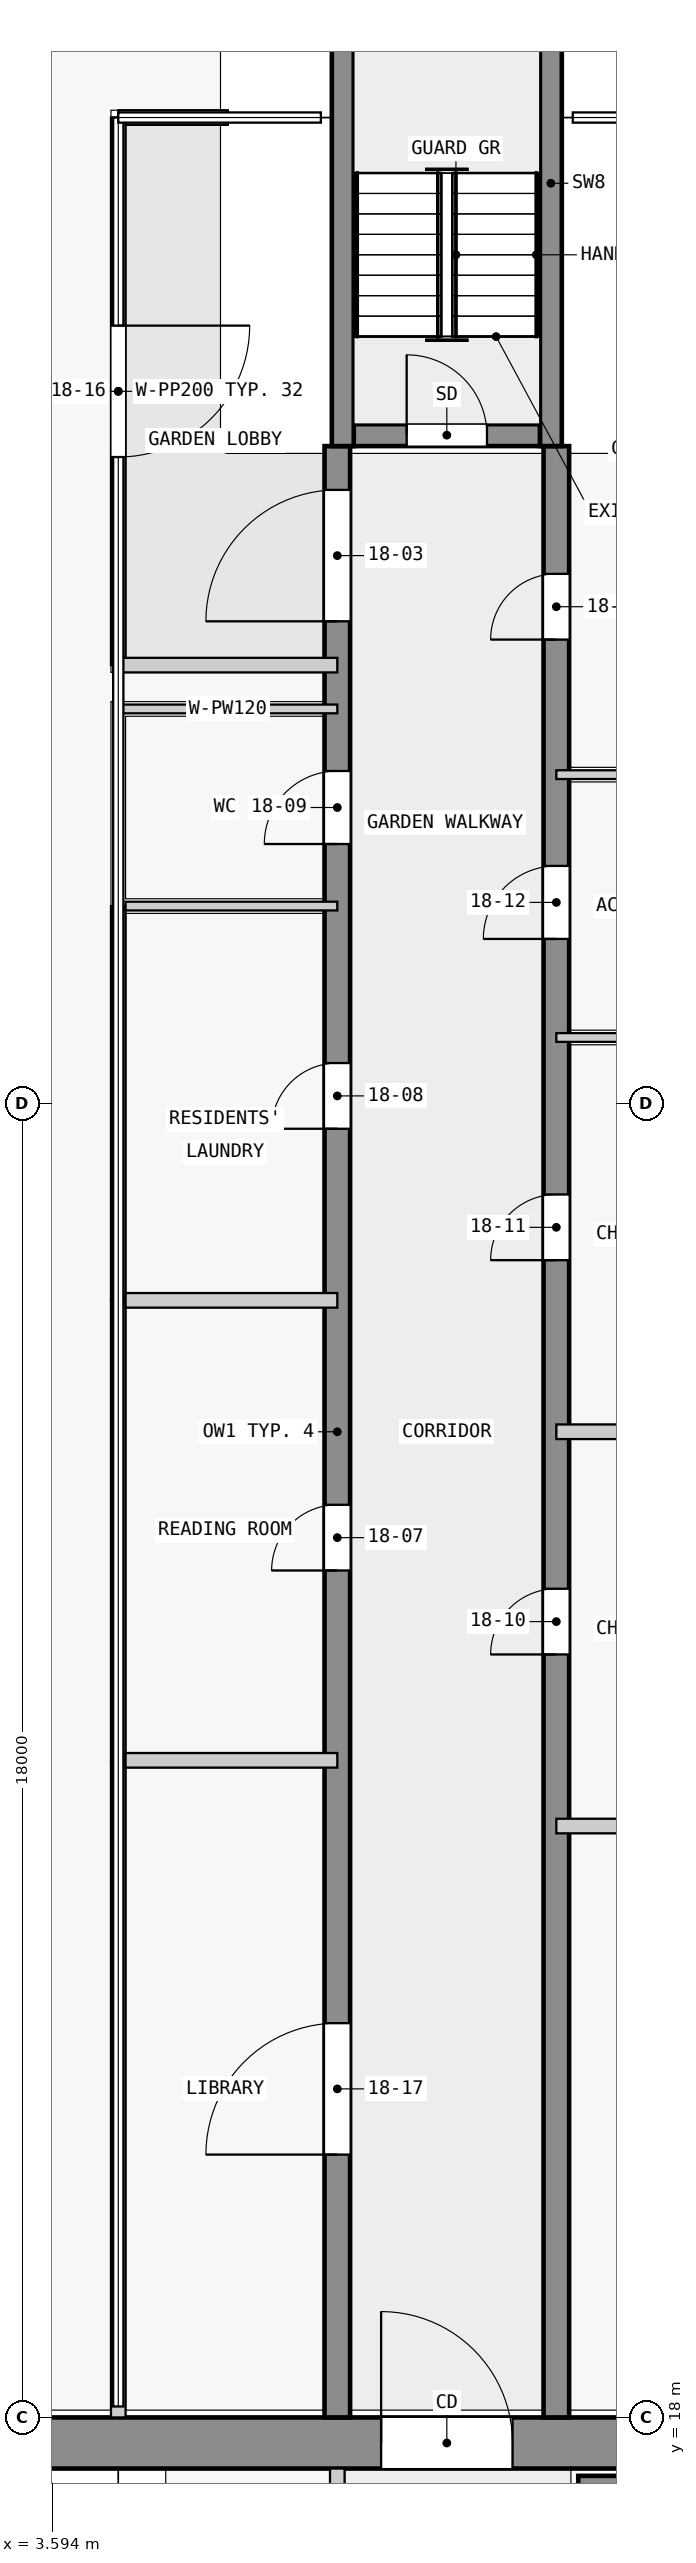
"""IFC4 building model, lengths in metres.
Left out: names, types, materials, properties, quantities, classifications, styles, units other than length and angle.
Written with IfcOpenShell. Run it as: python <this file> out.ifc"""

import sys

from ifc_helpers import new_model, si_unit, direction, frame, frame_2d, origin, place, context, subcontext, project, spatial, rectangle, extrude, element, fill, save


model = new_model("IFC4")
c1 = context("Model", 3, precision=1e-05, world=origin(), true_north=direction((0.0, 1.0)))
c2 = subcontext(c1, "Body", "Model", "MODEL_VIEW")
j1 = project(units=[si_unit("LENGTHUNIT", "METRE"), si_unit("PLANEANGLEUNIT", "RADIAN")], contexts=[c1])
p1 = place(None, origin())
s1 = spatial("IfcSite", under=j1, at=p1, CompositionType="ELEMENT")
p2 = place(p1, origin())
s2 = spatial("IfcBuilding", under=s1, at=p2, CompositionType="ELEMENT")
p3 = place(p2, frame((0.0, 0.0, 72.3)))
s3 = spatial("IfcBuildingStorey", under=s2, at=p3, CompositionType="ELEMENT", Elevation=72.3)
p4 = place(p3, frame((1.6, 17.65, 0.0), z_axis=(0.0, 0.0, 1.0), x_axis=(1.0, 0.0, 0.0)))
e1 = element("IfcWall", 1, at=p4, inside=s3, PredefinedType="SHEAR", context=c2, shape_type="SweptSolid", body=[
    extrude(rectangle(XDim=20.9, YDim=0.7, at=frame_2d((10.45, 0.0))), origin(), (0.0, 0.0, 1.0), 5.75),
])
p5 = place(p4, frame((6.5, 0.0, 0.0)))
e2 = element("IfcOpeningElement", 2, at=p5, cuts=e1, PredefinedType="OPENING", context=c2, shape_type="SweptSolid", body=[
    extrude(rectangle(XDim=1.8, YDim=2.1, at=frame_2d((0.9, 1.05))), frame((0.0, 0.36, 0.0), z_axis=(0.0, -1.0, 0.0), x_axis=(1.0, 0.0, 0.0)), (0.0, 0.0, 1.0), 0.72),
])
p6 = place(p3, frame((10.8, 17.05, 0.0), z_axis=(0.0, 0.0, 1.0), x_axis=(1.0, 0.0, 0.0)))
e3 = element("IfcWall", 3, at=p6, inside=s3, PredefinedType="SHEAR", context=c2, shape_type="SweptSolid", body=[
    extrude(rectangle(XDim=7.8, YDim=0.3, at=frame_2d((3.9, 0.0))), origin(), (0.0, 0.0, 1.0), 5.75),
])
p7 = place(p3, frame((7.725, 45.15, 0.0), z_axis=(0.0, 0.0, 1.0), x_axis=(1.0, 0.0, 0.0)))
e4 = element("IfcWall", 4, at=p7, inside=s3, PredefinedType="SHEAR", context=c2, shape_type="SweptSolid", body=[
    extrude(rectangle(XDim=2.55, YDim=0.3, at=frame_2d((1.275, 0.0))), origin(), (0.0, 0.0, 1.0), 6.0),
])
p8 = place(p7, frame((0.725, 0.0, 0.0)))
e5 = element("IfcOpeningElement", 5, at=p8, cuts=e4, PredefinedType="OPENING", context=c2, shape_type="SweptSolid", body=[
    extrude(rectangle(XDim=1.1, YDim=2.1, at=frame_2d((0.55, 1.05))), frame((0.0, 0.16, 0.0), z_axis=(0.0, -1.0, 0.0), x_axis=(1.0, 0.0, 0.0)), (0.0, 0.0, 1.0), 0.32),
])
for number, where, z_axis, x_axis in (
    (6, (7.575, 45.0, 0.0), (0.0, 0.0, 1.0), (0.0, 1.0, 0.0)),
    (7, (10.425, 45.0, 0.0), (0.0, 0.0, 1.0), (0.0, 1.0, 0.0)),
):
    element("IfcWall", number, at=place(p3, frame(where, z_axis=z_axis, x_axis=x_axis)), inside=s3, PredefinedType="SHEAR", context=c2, shape_type="SweptSolid", body=[
        extrude(rectangle(XDim=7.2, YDim=0.3, at=frame_2d((3.6, 0.0))), origin(), (0.0, 0.0, 1.0), 6.0),
    ])
p9 = place(p3, frame((7.5, 18.0, 0.0), z_axis=(0.0, 0.0, 1.0), x_axis=(0.0, 1.0, 0.0)))
e8 = element("IfcWall", 8, at=p9, inside=s3, PredefinedType="SHEAR", context=c2, shape_type="SweptSolid", body=[
    extrude(rectangle(XDim=27.0, YDim=0.35, at=frame_2d((13.5, 0.0))), origin(), (0.0, 0.0, 1.0), 5.75),
])
p10 = place(p9, frame((24.6, 0.0, 0.0)))
e9 = element("IfcOpeningElement", 9, at=p10, cuts=e8, PredefinedType="OPENING", context=c2, shape_type="SweptSolid", body=[
    extrude(rectangle(XDim=1.8, YDim=2.1, at=frame_2d((0.9, 1.05))), frame((0.0, 0.185, 0.0), z_axis=(0.0, -1.0, 0.0), x_axis=(1.0, 0.0, 0.0)), (0.0, 0.0, 1.0), 0.37),
])
p11 = place(p9, frame((11.6, 0.0, 0.0)))
e10 = element("IfcOpeningElement", 10, at=p11, cuts=e8, PredefinedType="OPENING", context=c2, shape_type="SweptSolid", body=[
    extrude(rectangle(XDim=0.9, YDim=2.1, at=frame_2d((0.45, 1.05))), frame((0.0, 0.185, 0.0), z_axis=(0.0, -1.0, 0.0), x_axis=(1.0, 0.0, 0.0)), (0.0, 0.0, 1.0), 0.37),
])
p12 = place(p9, frame((17.65, 0.0, 0.0)))
e11 = element("IfcOpeningElement", 11, at=p12, cuts=e8, PredefinedType="OPENING", context=c2, shape_type="SweptSolid", body=[
    extrude(rectangle(XDim=0.9, YDim=2.1, at=frame_2d((0.45, 1.05))), frame((0.0, 0.185, 0.0), z_axis=(0.0, -1.0, 0.0), x_axis=(1.0, 0.0, 0.0)), (0.0, 0.0, 1.0), 0.37),
])
p13 = place(p9, frame((21.55, 0.0, 0.0)))
e12 = element("IfcOpeningElement", 12, at=p13, cuts=e8, PredefinedType="OPENING", context=c2, shape_type="SweptSolid", body=[
    extrude(rectangle(XDim=1.0, YDim=2.1, at=frame_2d((0.5, 1.05))), frame((0.0, 0.185, 0.0), z_axis=(0.0, -1.0, 0.0), x_axis=(1.0, 0.0, 0.0)), (0.0, 0.0, 1.0), 0.37),
])
p14 = place(p9, frame((3.6, 0.0, 0.0)))
e13 = element("IfcOpeningElement", 13, at=p14, cuts=e8, PredefinedType="OPENING", context=c2, shape_type="SweptSolid", body=[
    extrude(rectangle(XDim=1.8, YDim=2.1, at=frame_2d((0.9, 1.05))), frame((0.0, 0.185, 0.0), z_axis=(0.0, -1.0, 0.0), x_axis=(1.0, 0.0, 0.0)), (0.0, 0.0, 1.0), 0.37),
])
p15 = place(p3, frame((10.5, 18.0, 0.0), z_axis=(0.0, 0.0, 1.0), x_axis=(0.0, 1.0, 0.0)))
e14 = element("IfcWall", 14, at=p15, inside=s3, PredefinedType="SHEAR", context=c2, shape_type="SweptSolid", body=[
    extrude(rectangle(XDim=27.0, YDim=0.35, at=frame_2d((13.5, 0.0))), origin(), (0.0, 0.0, 1.0), 5.75),
])
p16 = place(p15, frame((10.45, 0.0, 0.0)))
e15 = element("IfcOpeningElement", 15, at=p16, cuts=e14, PredefinedType="OPENING", context=c2, shape_type="SweptSolid", body=[
    extrude(rectangle(XDim=0.9, YDim=2.1, at=frame_2d((0.45, 1.05))), frame((0.0, 0.185, 0.0), z_axis=(0.0, -1.0, 0.0), x_axis=(1.0, 0.0, 0.0)), (0.0, 0.0, 1.0), 0.37),
])
p17 = place(p15, frame((15.85, 0.0, 0.0)))
e16 = element("IfcOpeningElement", 16, at=p17, cuts=e14, PredefinedType="OPENING", context=c2, shape_type="SweptSolid", body=[
    extrude(rectangle(XDim=0.9, YDim=2.1, at=frame_2d((0.45, 1.05))), frame((0.0, 0.185, 0.0), z_axis=(0.0, -1.0, 0.0), x_axis=(1.0, 0.0, 0.0)), (0.0, 0.0, 1.0), 0.37),
])
p18 = place(p15, frame((20.25, 0.0, 0.0)))
e17 = element("IfcOpeningElement", 17, at=p18, cuts=e14, PredefinedType="OPENING", context=c2, shape_type="SweptSolid", body=[
    extrude(rectangle(XDim=1.0, YDim=2.1, at=frame_2d((0.5, 1.05))), frame((0.0, 0.185, 0.0), z_axis=(0.0, -1.0, 0.0), x_axis=(1.0, 0.0, 0.0)), (0.0, 0.0, 1.0), 0.37),
])
p19 = place(p15, frame((24.35, 0.0, 0.0)))
e18 = element("IfcOpeningElement", 18, at=p19, cuts=e14, PredefinedType="OPENING", context=c2, shape_type="SweptSolid", body=[
    extrude(rectangle(XDim=0.9, YDim=2.1, at=frame_2d((0.45, 1.05))), frame((0.0, 0.185, 0.0), z_axis=(0.0, -1.0, 0.0), x_axis=(1.0, 0.0, 0.0)), (0.0, 0.0, 1.0), 0.37),
])
p20 = place(p3, frame((7.5, 10.1, 0.0), z_axis=(0.0, 0.0, 1.0), x_axis=(0.0, 1.0, 0.0)))
e19 = element("IfcWall", 19, at=p20, inside=s3, PredefinedType="PARTITIONING", context=c2, shape_type="SweptSolid", body=[
    extrude(rectangle(XDim=7.2, YDim=0.2, at=frame_2d((3.6, 0.0))), origin(), (0.0, 0.0, 1.0), 5.75),
])
p21 = place(p20, frame((0.75, 0.0, 0.0)))
e20 = element("IfcOpeningElement", 20, at=p21, cuts=e19, PredefinedType="OPENING", context=c2, shape_type="SweptSolid", body=[
    extrude(rectangle(XDim=0.9, YDim=2.1, at=frame_2d((0.45, 1.05))), frame((0.0, 0.11, 0.0), z_axis=(0.0, -1.0, 0.0), x_axis=(1.0, 0.0, 0.0)), (0.0, 0.0, 1.0), 0.22),
])
p22 = place(p20, frame((4.35, 0.0, 0.0)))
e21 = element("IfcOpeningElement", 21, at=p22, cuts=e19, PredefinedType="OPENING", context=c2, shape_type="SweptSolid", body=[
    extrude(rectangle(XDim=0.9, YDim=2.1, at=frame_2d((0.45, 1.05))), frame((0.0, 0.11, 0.0), z_axis=(0.0, -1.0, 0.0), x_axis=(1.0, 0.0, 0.0)), (0.0, 0.0, 1.0), 0.22),
])
p23 = place(p3, frame((6.0, 49.5, 0.0), z_axis=(0.0, 0.0, 1.0), x_axis=(-1.0, 0.0, 0.0)))
e22 = element("IfcWall", 22, at=p23, inside=s3, PredefinedType="PARTITIONING", context=c2, shape_type="SweptSolid", body=[
    extrude(rectangle(XDim=1.5, YDim=0.2, at=frame_2d((0.75, 0.0))), origin(), (0.0, 0.0, 1.0), 5.75),
])
p24 = place(p3, frame((4.5, 49.5, 0.0), z_axis=(0.0, 0.0, 1.0), x_axis=(0.0, -1.0, 0.0)))
e23 = element("IfcWall", 23, at=p24, inside=s3, PredefinedType="PARTITIONING", context=c2, shape_type="SweptSolid", body=[
    extrude(rectangle(XDim=7.5, YDim=0.2, at=frame_2d((3.75, 0.0))), origin(), (0.0, 0.0, 1.0), 5.75),
])
p25 = place(p24, frame((2.85, 0.0, 0.0)))
e24 = element("IfcOpeningElement", 24, at=p25, cuts=e23, PredefinedType="OPENING", context=c2, shape_type="SweptSolid", body=[
    extrude(rectangle(XDim=1.8, YDim=2.1, at=frame_2d((0.9, 1.05))), frame((0.0, 0.11, 0.0), z_axis=(0.0, -1.0, 0.0), x_axis=(1.0, 0.0, 0.0)), (0.0, 0.0, 1.0), 0.22),
])
p26 = place(p3, frame((4.5, 42.0, 0.0), z_axis=(0.0, 0.0, 1.0), x_axis=(1.0, 0.0, 0.0)))
e25 = element("IfcWall", 25, at=p26, inside=s3, PredefinedType="PARTITIONING", context=c2, shape_type="SweptSolid", body=[
    extrude(rectangle(XDim=3.0, YDim=0.2, at=frame_2d((1.5, 0.0))), origin(), (0.0, 0.0, 1.0), 5.75),
])
p27 = place(p3, frame((4.5, 27.0, 0.0), z_axis=(0.0, 0.0, 1.0), x_axis=(0.0, -1.0, 0.0)))
e26 = element("IfcWall", 26, at=p27, inside=s3, PredefinedType="PARTITIONING", context=c2, shape_type="SweptSolid", body=[
    extrude(rectangle(XDim=9.0, YDim=0.2, at=frame_2d((4.5, 0.0))), origin(), (0.0, 0.0, 1.0), 5.75),
])
p28 = place(p3, frame((4.5, 33.3, 0.0), z_axis=(0.0, 0.0, 1.0), x_axis=(0.0, -1.0, 0.0)))
e27 = element("IfcWall", 27, at=p28, inside=s3, PredefinedType="PARTITIONING", context=c2, shape_type="SweptSolid", body=[
    extrude(rectangle(XDim=6.3, YDim=0.2, at=frame_2d((3.15, 0.0))), origin(), (0.0, 0.0, 1.0), 5.75),
])
p29 = place(p3, frame((7.5, 41.4, 0.0), z_axis=(0.0, 0.0, 1.0), x_axis=(-1.0, 0.0, 0.0)))
e28 = element("IfcWall", 28, at=p29, inside=s3, PredefinedType="PARTITIONING", context=c2, shape_type="SweptSolid", body=[
    extrude(rectangle(XDim=3.0, YDim=0.12, at=frame_2d((1.5, 0.0))), origin(), (0.0, 0.0, 1.0), 5.75),
])
p30 = place(p3, frame((4.5, 41.4, 0.0), z_axis=(0.0, 0.0, 1.0), x_axis=(0.0, -1.0, 0.0)))
e29 = element("IfcWall", 29, at=p30, inside=s3, PredefinedType="PARTITIONING", context=c2, shape_type="SweptSolid", body=[
    extrude(rectangle(XDim=2.7, YDim=0.12, at=frame_2d((1.35, 0.0))), origin(), (0.0, 0.0, 1.0), 5.75),
])
p31 = place(p3, frame((4.5, 38.7, 0.0), z_axis=(0.0, 0.0, 1.0), x_axis=(0.0, -1.0, 0.0)))
e30 = element("IfcWall", 30, at=p31, inside=s3, PredefinedType="PARTITIONING", context=c2, shape_type="SweptSolid", body=[
    extrude(rectangle(XDim=5.4, YDim=0.2, at=frame_2d((2.7, 0.0))), origin(), (0.0, 0.0, 1.0), 5.75),
])
p32 = place(p3, frame((4.6, 33.3, 0.0), z_axis=(0.0, 0.0, 1.0), x_axis=(1.0, 0.0, 0.0)))
e31 = element("IfcWall", 31, at=p32, inside=s3, PredefinedType="PARTITIONING", context=c2, shape_type="SweptSolid", body=[
    extrude(rectangle(XDim=2.9, YDim=0.2, at=frame_2d((1.45, 0.0))), origin(), (0.0, 0.0, 1.0), 5.75),
])
p33 = place(p3, frame((4.6, 38.7, 0.0), z_axis=(0.0, 0.0, 1.0), x_axis=(1.0, 0.0, 0.0)))
e32 = element("IfcWall", 32, at=p33, inside=s3, PredefinedType="PARTITIONING", context=c2, shape_type="SweptSolid", body=[
    extrude(rectangle(XDim=2.9, YDim=0.12, at=frame_2d((1.45, 0.0))), origin(), (0.0, 0.0, 1.0), 5.75),
])
p34 = place(p3, frame((4.6, 27.0, 0.0), z_axis=(0.0, 0.0, 1.0), x_axis=(1.0, 0.0, 0.0)))
e33 = element("IfcWall", 33, at=p34, inside=s3, PredefinedType="PARTITIONING", context=c2, shape_type="SweptSolid", body=[
    extrude(rectangle(XDim=2.9, YDim=0.2, at=frame_2d((1.45, 0.0))), origin(), (0.0, 0.0, 1.0), 5.75),
])
p35 = place(p3, frame((10.5, 36.9, 0.0), z_axis=(0.0, 0.0, 1.0), x_axis=(1.0, 0.0, 0.0)))
e34 = element("IfcWall", 34, at=p35, inside=s3, PredefinedType="PARTITIONING", context=c2, shape_type="SweptSolid", body=[
    extrude(rectangle(XDim=2.9, YDim=0.12, at=frame_2d((1.45, 0.0))), origin(), (0.0, 0.0, 1.0), 5.75),
])
for number, where, z_axis, x_axis in (
    (35, (10.5, 26.1, 0.0), (0.0, 0.0, 1.0), (1.0, 0.0, 0.0)),
    (36, (10.5, 31.5, 0.0), (0.0, 0.0, 1.0), (1.0, 0.0, 0.0)),
):
    element("IfcWall", number, at=place(p3, frame(where, z_axis=z_axis, x_axis=x_axis)), inside=s3, PredefinedType="PARTITIONING", context=c2, shape_type="SweptSolid", body=[
        extrude(rectangle(XDim=2.9, YDim=0.2, at=frame_2d((1.45, 0.0))), origin(), (0.0, 0.0, 1.0), 5.75),
    ])
p36 = place(p3, frame((10.5, 40.5, 0.0), z_axis=(0.0, 0.0, 1.0), x_axis=(1.0, 0.0, 0.0)))
e37 = element("IfcWall", 37, at=p36, inside=s3, PredefinedType="PARTITIONING", context=c2, shape_type="SweptSolid", body=[
    extrude(rectangle(XDim=2.9, YDim=0.12, at=frame_2d((1.45, 0.0))), origin(), (0.0, 0.0, 1.0), 5.75),
])
p37 = place(p5, origin())
e38 = element("IfcDoor", 38, at=p37, inside=s3, OperationType="DOUBLE_DOOR_SINGLE_SWING", PredefinedType="DOOR", context=c2, shape_type="SweptSolid", body=[
    extrude(rectangle(XDim=1.8, YDim=2.1, at=frame_2d((0.9, 1.05))), frame((0.0, 0.025, 0.0), z_axis=(0.0, -1.0, 0.0), x_axis=(1.0, 0.0, 0.0)), (0.0, 0.0, 1.0), 0.05),
])
fill(e2, e38)
p38 = place(p8, origin())
e39 = element("IfcDoor", 39, at=p38, inside=s3, OperationType="SINGLE_SWING_LEFT", PredefinedType="DOOR", context=c2, shape_type="SweptSolid", body=[
    extrude(rectangle(XDim=1.1, YDim=2.1, at=frame_2d((0.55, 1.05))), frame((0.0, 0.025, 0.0), z_axis=(0.0, -1.0, 0.0), x_axis=(1.0, 0.0, 0.0)), (0.0, 0.0, 1.0), 0.05),
])
fill(e5, e39)
p39 = place(p10, origin())
e40 = element("IfcDoor", 40, at=p39, inside=s3, OperationType="DOUBLE_DOOR_SINGLE_SWING", PredefinedType="DOOR", context=c2, shape_type="SweptSolid", body=[
    extrude(rectangle(XDim=1.8, YDim=2.1, at=frame_2d((0.9, 1.05))), frame((0.0, 0.025, 0.0), z_axis=(0.0, -1.0, 0.0), x_axis=(1.0, 0.0, 0.0)), (0.0, 0.0, 1.0), 0.05),
])
fill(e9, e40)
p40 = place(p11, origin())
e41 = element("IfcDoor", 41, at=p40, inside=s3, OperationType="SINGLE_SWING_LEFT", PredefinedType="DOOR", context=c2, shape_type="SweptSolid", body=[
    extrude(rectangle(XDim=0.9, YDim=2.1, at=frame_2d((0.45, 1.05))), frame((0.0, 0.025, 0.0), z_axis=(0.0, -1.0, 0.0), x_axis=(1.0, 0.0, 0.0)), (0.0, 0.0, 1.0), 0.05),
])
fill(e10, e41)
p41 = place(p12, origin())
e42 = element("IfcDoor", 42, at=p41, inside=s3, OperationType="SINGLE_SWING_RIGHT", PredefinedType="DOOR", context=c2, shape_type="SweptSolid", body=[
    extrude(rectangle(XDim=0.9, YDim=2.1, at=frame_2d((0.45, 1.05))), frame((0.0, 0.025, 0.0), z_axis=(0.0, -1.0, 0.0), x_axis=(1.0, 0.0, 0.0)), (0.0, 0.0, 1.0), 0.05),
])
fill(e11, e42)
p42 = place(p13, origin())
e43 = element("IfcDoor", 43, at=p42, inside=s3, OperationType="SINGLE_SWING_RIGHT", PredefinedType="DOOR", context=c2, shape_type="SweptSolid", body=[
    extrude(rectangle(XDim=1.0, YDim=2.1, at=frame_2d((0.5, 1.05))), frame((0.0, 0.025, 0.0), z_axis=(0.0, -1.0, 0.0), x_axis=(1.0, 0.0, 0.0)), (0.0, 0.0, 1.0), 0.05),
])
fill(e12, e43)
p43 = place(p16, origin())
e44 = element("IfcDoor", 44, at=p43, inside=s3, OperationType="SINGLE_SWING_LEFT", PredefinedType="DOOR", context=c2, shape_type="SweptSolid", body=[
    extrude(rectangle(XDim=0.9, YDim=2.1, at=frame_2d((0.45, 1.05))), frame((0.0, 0.025, 0.0), z_axis=(0.0, -1.0, 0.0), x_axis=(1.0, 0.0, 0.0)), (0.0, 0.0, 1.0), 0.05),
])
fill(e15, e44)
p44 = place(p17, origin())
e45 = element("IfcDoor", 45, at=p44, inside=s3, OperationType="SINGLE_SWING_RIGHT", PredefinedType="DOOR", context=c2, shape_type="SweptSolid", body=[
    extrude(rectangle(XDim=0.9, YDim=2.1, at=frame_2d((0.45, 1.05))), frame((0.0, 0.025, 0.0), z_axis=(0.0, -1.0, 0.0), x_axis=(1.0, 0.0, 0.0)), (0.0, 0.0, 1.0), 0.05),
])
fill(e16, e45)
p45 = place(p18, origin())
e46 = element("IfcDoor", 46, at=p45, inside=s3, OperationType="SINGLE_SWING_RIGHT", PredefinedType="DOOR", context=c2, shape_type="SweptSolid", body=[
    extrude(rectangle(XDim=1.0, YDim=2.1, at=frame_2d((0.5, 1.05))), frame((0.0, 0.025, 0.0), z_axis=(0.0, -1.0, 0.0), x_axis=(1.0, 0.0, 0.0)), (0.0, 0.0, 1.0), 0.05),
])
fill(e17, e46)
p46 = place(p19, origin())
e47 = element("IfcDoor", 47, at=p46, inside=s3, OperationType="SINGLE_SWING_RIGHT", PredefinedType="DOOR", context=c2, shape_type="SweptSolid", body=[
    extrude(rectangle(XDim=0.9, YDim=2.1, at=frame_2d((0.45, 1.05))), frame((0.0, 0.025, 0.0), z_axis=(0.0, -1.0, 0.0), x_axis=(1.0, 0.0, 0.0)), (0.0, 0.0, 1.0), 0.05),
])
fill(e18, e47)
p47 = place(p25, origin())
e48 = element("IfcDoor", 48, at=p47, inside=s3, OperationType="DOUBLE_DOOR_SINGLE_SWING", PredefinedType="DOOR", context=c2, shape_type="SweptSolid", body=[
    extrude(rectangle(XDim=1.8, YDim=2.1, at=frame_2d((0.9, 1.05))), frame((0.0, 0.025, 0.0), z_axis=(0.0, -1.0, 0.0), x_axis=(1.0, 0.0, 0.0)), (0.0, 0.0, 1.0), 0.05),
])
fill(e24, e48)
p48 = place(p14, origin())
e49 = element("IfcDoor", 49, at=p48, inside=s3, OperationType="DOUBLE_DOOR_SINGLE_SWING", PredefinedType="DOOR", context=c2, shape_type="SweptSolid", body=[
    extrude(rectangle(XDim=1.8, YDim=2.1, at=frame_2d((0.9, 1.05))), frame((0.0, 0.025, 0.0), z_axis=(0.0, -1.0, 0.0), x_axis=(1.0, 0.0, 0.0)), (0.0, 0.0, 1.0), 0.05),
])
fill(e13, e49)
save(model, sys.argv[1])
